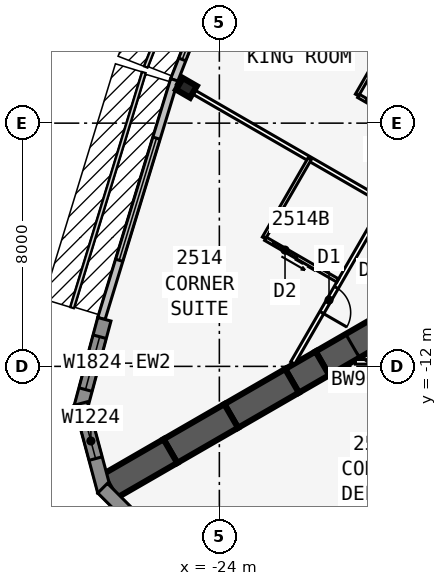
"""IFC4 building model, lengths in metres.
Left out: names, types, materials, properties, quantities, classifications, styles, units other than length and angle.
Written with IfcOpenShell. Run it as: python <this file> out.ifc"""

import sys

from ifc_helpers import new_model, si_unit, direction, frame, frame_2d, origin, origin_2d, place, context, subcontext, project, spatial, polyline, rectangle, i_section, outline, extrude, element, fill, save


model = new_model("IFC4")
c1 = context("Model", 3, precision=1e-05, world=origin(), true_north=direction((0.0, 1.0)))
c2 = subcontext(c1, "Body", "Model", "MODEL_VIEW")
j1 = project(units=[si_unit("LENGTHUNIT", "METRE"), si_unit("PLANEANGLEUNIT", "RADIAN")], contexts=[c1])
p1 = place(None, origin())
s1 = spatial("IfcSite", under=j1, at=p1, CompositionType="ELEMENT")
p2 = place(p1, origin())
s2 = spatial("IfcBuilding", under=s1, at=p2, CompositionType="ELEMENT")
p3 = place(p2, frame((0.0, 0.0, 96.5)))
s3 = spatial("IfcBuildingStorey", under=s2, at=p3, CompositionType="ELEMENT", Elevation=96.5)
p4 = place(p3, frame((-16.5, -9.526, 0.0), z_axis=(0.0, 0.0, 1.0), x_axis=(-0.866031398331, -0.499989616998, 0.0)))
e1 = element("IfcWall", 1, at=p4, inside=s3, PredefinedType="SHEAR", context=c2, shape_type="SweptSolid", body=[
    extrude(rectangle(XDim=4.746, YDim=0.9, at=frame_2d((2.373, 0.0))), origin(), (0.0, 0.0, 1.0), 3.4),
])
p5 = place(p4, frame((1.8, 0.0, 0.0)))
e2 = element("IfcOpeningElement", 2, at=p5, cuts=e1, PredefinedType="OPENING", context=c2, shape_type="SweptSolid", body=[
    extrude(rectangle(XDim=1.8, YDim=2.13, at=frame_2d((0.9, 1.065))), frame((0.0, 0.46, 0.0), z_axis=(0.0, -1.0, 0.0), x_axis=(1.0, 0.0, 0.0)), (0.0, 0.0, 1.0), 0.92),
])
p6 = place(p3, frame((-20.61, -11.899, 0.0), z_axis=(0.0, 0.0, 1.0), x_axis=(-0.866009537788, -0.500027479704, 0.0)))
e3 = element("IfcWall", 3, at=p6, inside=s3, PredefinedType="SHEAR", context=c2, shape_type="SweptSolid", body=[
    extrude(rectangle(XDim=1.155, YDim=0.9, at=frame_2d((0.577, 0.0))), origin(), (0.0, 0.0, 1.0), 3.4),
])
for number, where, z_axis, x_axis in (
    (4, (-21.61, -12.477, 0.0), (0.0, 0.0, 1.0), (-0.866, -0.5, 0.0)),
    (5, (-23.61, -13.631, 0.0), (0.0, 0.0, 1.0), (-0.866, -0.5, 0.0)),
    (6, (-25.61, -14.786, 0.0), (0.0, 0.0, 1.0), (-0.866, -0.5, 0.0)),
):
    element("IfcWall", number, at=place(p3, frame(where, z_axis=z_axis, x_axis=x_axis)), inside=s3, PredefinedType="SHEAR", context=c2, shape_type="SweptSolid", body=[
        extrude(rectangle(XDim=2.309, YDim=0.9, at=frame_2d((1.155, 0.0))), origin(), (0.0, 0.0, 1.0), 3.4),
    ])
p7 = place(p3, frame((-25.083, -2.839, 0.0), z_axis=(0.0, 0.0, 1.0), x_axis=(-0.5, -0.866025403784, 0.0)))
e7 = element("IfcColumn", 7, at=p7, inside=s3, PredefinedType="COLUMN", context=c2, shape_type="SweptSolid", body=[
    extrude(i_section(OverallWidth=0.442, OverallDepth=0.531, WebThickness=0.066, FlangeThickness=0.106, at=origin_2d()), origin(), (0.0, 0.0, 1.0), 3.4),
])
p8 = place(p3, frame((-23.645, 2.126, 0.0), z_axis=(0.0, 0.0, 1.0), x_axis=(-0.364013463868, -0.931393685894, 0.0)))
e8 = element("IfcWall", 8, at=p8, inside=s3, PredefinedType="STANDARD", context=c2, shape_type="SweptSolid", body=[
    extrude(rectangle(XDim=5.058, YDim=0.25, at=frame_2d((2.529, 0.0))), origin(), (0.0, 0.0, 1.0), 3.235),
])
p9 = place(p8, frame((0.729, 0.0, 0.45)))
e9 = element("IfcOpeningElement", 9, at=p9, cuts=e8, PredefinedType="OPENING", context=c2, shape_type="SweptSolid", body=[
    extrude(rectangle(XDim=3.6, YDim=2.4, at=frame_2d((1.8, 1.2))), frame((0.0, 0.135, 0.0), z_axis=(0.0, -1.0, 0.0), x_axis=(1.0, 0.0, 0.0)), (0.0, 0.0, 1.0), 0.27),
])
p10 = place(p3, frame((-25.483, -2.575, 0.0), z_axis=(0.0, 0.0, 1.0), x_axis=(-0.2919790669, -0.956424709265, 0.0)))
e10 = element("IfcWall", 10, at=p10, inside=s3, PredefinedType="STANDARD", context=c2, shape_type="SweptSolid", body=[
    extrude(rectangle(XDim=8.211, YDim=0.25, at=frame_2d((4.105, 0.0))), origin(), (0.0, 0.0, 1.0), 3.235),
])
p11 = place(p10, frame((2.006, 0.0, 0.45)))
e11 = element("IfcOpeningElement", 11, at=p11, cuts=e10, PredefinedType="OPENING", context=c2, shape_type="SweptSolid", body=[
    extrude(rectangle(XDim=4.2, YDim=2.4, at=frame_2d((2.1, 1.2))), frame((0.0, 0.135, 0.0), z_axis=(0.0, -1.0, 0.0), x_axis=(1.0, 0.0, 0.0)), (0.0, 0.0, 1.0), 0.27),
])
p12 = place(p3, frame((-27.783, -10.45, 0.0), z_axis=(0.0, 0.0, 1.0), x_axis=(-0.258780998834, -0.965936019953, 0.0)))
e12 = element("IfcWall", 12, at=p12, inside=s3, PredefinedType="SOLIDWALL", context=c2, shape_type="SweptSolid", body=[
    extrude(rectangle(XDim=2.989, YDim=0.45, at=frame_2d((1.494, 0.0))), origin(), (0.0, 0.0, 1.0), 3.235),
])
p13 = place(p12, frame((0.594, 0.0, 0.45)))
e13 = element("IfcOpeningElement", 13, at=p13, cuts=e12, PredefinedType="OPENING", context=c2, shape_type="SweptSolid", body=[
    extrude(rectangle(XDim=1.8, YDim=2.4, at=frame_2d((0.9, 1.2))), frame((0.0, 0.235, 0.0), z_axis=(0.0, -1.0, 0.0), x_axis=(1.0, 0.0, 0.0)), (0.0, 0.0, 1.0), 0.47),
])
p14 = place(p3, frame((-28.556, -13.221, 0.0), z_axis=(0.0, 0.0, 1.0), x_axis=(0.258801419081, -0.965930548995, 0.0)))
e14 = element("IfcWall", 14, at=p14, inside=s3, PredefinedType="SOLIDWALL", context=c2, shape_type="SweptSolid", body=[
    extrude(outline(polyline([(2.989, 0.225), (2.929, 0.225), (2.437, 0.093), (2.402, 0.225), (0.0, 0.225), (0.0, -0.225), (2.989, -0.225), (2.989, 0.225)])), origin(), (0.0, 0.0, 1.0), 3.235),
])
p15 = place(p14, frame((0.676, 0.0, 0.45)))
e15 = element("IfcOpeningElement", 15, at=p15, cuts=e14, PredefinedType="OPENING", context=c2, shape_type="SweptSolid", body=[
    extrude(rectangle(XDim=1.2, YDim=2.4, at=frame_2d((0.6, 1.2))), frame((0.0, 0.235, 0.0), z_axis=(0.0, -1.0, 0.0), x_axis=(1.0, 0.0, 0.0)), (0.0, 0.0, 1.0), 0.47),
])
p16 = place(p3, frame((-27.841, -16.007, 0.0), z_axis=(0.0, 0.0, 1.0), x_axis=(0.707025086683, -0.707188466253, 0.0)))
e16 = element("IfcWall", 16, at=p16, inside=s3, PredefinedType="SOLIDWALL", context=c2, shape_type="SweptSolid", body=[
    extrude(outline(polyline([(2.989, 0.225), (0.586, 0.225), (0.551, 0.093), (0.059, 0.225), (0.0, 0.225), (0.0, -0.225), (2.989, -0.225), (2.989, 0.225)])), origin(), (0.0, 0.0, 1.0), 3.235),
])
p17 = place(p16, frame((1.113, 0.0, 0.45)))
e17 = element("IfcOpeningElement", 17, at=p17, cuts=e16, PredefinedType="OPENING", context=c2, shape_type="SweptSolid", body=[
    extrude(rectangle(XDim=1.2, YDim=2.4, at=frame_2d((0.6, 1.2))), frame((0.0, 0.235, 0.0), z_axis=(0.0, -1.0, 0.0), x_axis=(1.0, 0.0, 0.0)), (0.0, 0.0, 1.0), 0.47),
])
p18 = place(p3, frame((-19.527, -11.851, 0.0), z_axis=(0.0, 0.0, 1.0), x_axis=(1.0, 0.0, 0.0)))
e18 = element("IfcWall", 18, at=p18, inside=s3, PredefinedType="PARTITIONING", context=c2, shape_type="SweptSolid", body=[
    extrude(rectangle(XDim=39.054, YDim=0.15, at=frame_2d((19.527, 0.0))), origin(), (0.0, 0.0, 1.0), 3.235),
])
p19 = place(p18, frame((1.558, 0.0, 0.0)))
e19 = element("IfcOpeningElement", 19, at=p19, cuts=e18, PredefinedType="OPENING", context=c2, shape_type="SweptSolid", body=[
    extrude(rectangle(XDim=0.95, YDim=2.13, at=frame_2d((0.475, 1.065))), frame((0.0, 0.085, 0.0), z_axis=(0.0, -1.0, 0.0), x_axis=(1.0, 0.0, 0.0)), (0.0, 0.0, 1.0), 0.17),
])
p20 = place(p18, frame((11.552, 0.0, 0.0)))
e20 = element("IfcOpeningElement", 20, at=p20, cuts=e18, PredefinedType="OPENING", context=c2, shape_type="SweptSolid", body=[
    extrude(rectangle(XDim=0.95, YDim=2.13, at=frame_2d((0.475, 1.065))), frame((0.0, 0.085, 0.0), z_axis=(0.0, -1.0, 0.0), x_axis=(1.0, 0.0, 0.0)), (0.0, 0.0, 1.0), 0.17),
])
p21 = place(p18, frame((21.527, 0.0, 0.0)))
e21 = element("IfcOpeningElement", 21, at=p21, cuts=e18, PredefinedType="OPENING", context=c2, shape_type="SweptSolid", body=[
    extrude(rectangle(XDim=1.0, YDim=2.13, at=frame_2d((0.5, 1.065))), frame((0.0, 0.085, 0.0), z_axis=(0.0, -1.0, 0.0), x_axis=(1.0, 0.0, 0.0)), (0.0, 0.0, 1.0), 0.17),
])
p22 = place(p18, frame((26.552, 0.0, 0.0)))
e22 = element("IfcOpeningElement", 22, at=p22, cuts=e18, PredefinedType="OPENING", context=c2, shape_type="SweptSolid", body=[
    extrude(rectangle(XDim=0.95, YDim=2.13, at=frame_2d((0.475, 1.065))), frame((0.0, 0.085, 0.0), z_axis=(0.0, -1.0, 0.0), x_axis=(1.0, 0.0, 0.0)), (0.0, 0.0, 1.0), 0.17),
])
p23 = place(p18, frame((37.752, 0.0, 0.0)))
e23 = element("IfcOpeningElement", 23, at=p23, cuts=e18, PredefinedType="OPENING", context=c2, shape_type="SweptSolid", body=[
    extrude(rectangle(XDim=0.95, YDim=2.13, at=frame_2d((0.475, 1.065))), frame((0.0, 0.085, 0.0), z_axis=(0.0, -1.0, 0.0), x_axis=(1.0, 0.0, 0.0)), (0.0, 0.0, 1.0), 0.17),
])
p24 = place(p3, frame((-0.5, 24.636, 0.0), z_axis=(0.0, 0.0, 1.0), x_axis=(-0.500001915564, -0.86602429783, 0.0)))
e24 = element("IfcWall", 24, at=p24, inside=s3, PredefinedType="PARTITIONING", context=c2, shape_type="SweptSolid", body=[
    extrude(rectangle(XDim=42.172, YDim=0.15, at=frame_2d((21.086, 0.0))), origin(), (0.0, 0.0, 1.0), 3.235),
])
p25 = place(p24, frame((1.911, 0.0, 0.0)))
e25 = element("IfcOpeningElement", 25, at=p25, cuts=e24, PredefinedType="OPENING", context=c2, shape_type="SweptSolid", body=[
    extrude(rectangle(XDim=0.95, YDim=2.13, at=frame_2d((0.475, 1.065))), frame((0.0, 0.085, 0.0), z_axis=(0.0, -1.0, 0.0), x_axis=(1.0, 0.0, 0.0)), (0.0, 0.0, 1.0), 0.17),
])
p26 = place(p24, frame((8.111, 0.0, 0.0)))
e26 = element("IfcOpeningElement", 26, at=p26, cuts=e24, PredefinedType="OPENING", context=c2, shape_type="SweptSolid", body=[
    extrude(rectangle(XDim=0.95, YDim=2.13, at=frame_2d((0.475, 1.065))), frame((0.0, 0.085, 0.0), z_axis=(0.0, -1.0, 0.0), x_axis=(1.0, 0.0, 0.0)), (0.0, 0.0, 1.0), 0.17),
])
p27 = place(p24, frame((18.111, 0.0, 0.0)))
e27 = element("IfcOpeningElement", 27, at=p27, cuts=e24, PredefinedType="OPENING", context=c2, shape_type="SweptSolid", body=[
    extrude(rectangle(XDim=0.95, YDim=2.13, at=frame_2d((0.475, 1.065))), frame((0.0, 0.085, 0.0), z_axis=(0.0, -1.0, 0.0), x_axis=(1.0, 0.0, 0.0)), (0.0, 0.0, 1.0), 0.17),
])
p28 = place(p24, frame((28.711, 0.0, 0.0)))
e28 = element("IfcOpeningElement", 28, at=p28, cuts=e24, PredefinedType="OPENING", context=c2, shape_type="SweptSolid", body=[
    extrude(rectangle(XDim=0.95, YDim=2.13, at=frame_2d((0.475, 1.065))), frame((0.0, 0.085, 0.0), z_axis=(0.0, -1.0, 0.0), x_axis=(1.0, 0.0, 0.0)), (0.0, 0.0, 1.0), 0.17),
])
p29 = place(p24, frame((33.711, 0.0, 0.0)))
e29 = element("IfcOpeningElement", 29, at=p29, cuts=e24, PredefinedType="OPENING", context=c2, shape_type="SweptSolid", body=[
    extrude(rectangle(XDim=0.95, YDim=2.13, at=frame_2d((0.475, 1.065))), frame((0.0, 0.085, 0.0), z_axis=(0.0, -1.0, 0.0), x_axis=(1.0, 0.0, 0.0)), (0.0, 0.0, 1.0), 0.17),
])
p30 = place(p24, frame((39.311, 0.0, 0.0)))
e30 = element("IfcOpeningElement", 30, at=p30, cuts=e24, PredefinedType="OPENING", context=c2, shape_type="SweptSolid", body=[
    extrude(rectangle(XDim=0.95, YDim=2.13, at=frame_2d((0.475, 1.065))), frame((0.0, 0.085, 0.0), z_axis=(0.0, -1.0, 0.0), x_axis=(1.0, 0.0, 0.0)), (0.0, 0.0, 1.0), 0.17),
])
p31 = place(p3, frame((-16.108, -2.247, 0.0), z_axis=(0.0, 0.0, 1.0), x_axis=(-0.866018881988, 0.500011295912, 0.0)))
e31 = element("IfcWall", 31, at=p31, inside=s3, PredefinedType="PARTITIONING", context=c2, shape_type="SweptSolid", body=[
    extrude(rectangle(XDim=8.585, YDim=0.15, at=frame_2d((4.292, 0.0))), origin(), (0.0, 0.0, 1.0), 2.389),
])
p32 = place(p3, frame((-18.608, -6.577, 0.0), z_axis=(0.0, 0.0, 1.0), x_axis=(-0.866034818847, 0.499983692279, 0.0)))
e32 = element("IfcWall", 32, at=p32, inside=s3, PredefinedType="PARTITIONING", context=c2, shape_type="SweptSolid", body=[
    extrude(rectangle(XDim=7.82, YDim=0.15, at=frame_2d((3.91, 0.0))), origin(), (0.0, 0.0, 1.0), 2.389),
])
p33 = place(p3, frame((-18.273, -0.997, 0.0), z_axis=(0.0, 0.0, 1.0), x_axis=(-0.499957262057, -0.866050077142, 0.0)))
e33 = element("IfcWall", 33, at=p33, inside=s3, PredefinedType="PLUMBINGWALL", context=c2, shape_type="SweptSolid", body=[
    extrude(rectangle(XDim=2.4, YDim=0.12, at=frame_2d((1.2, 0.0))), origin(), (0.0, 0.0, 1.0), 3.235),
])
p34 = place(p3, frame((-17.308, -4.326, 0.0), z_axis=(0.0, 0.0, 1.0), x_axis=(-0.866023955769, 0.500002508028, 0.0)))
e34 = element("IfcWall", 34, at=p34, inside=s3, PredefinedType="PLUMBINGWALL", context=c2, shape_type="SweptSolid", body=[
    extrude(rectangle(XDim=2.44, YDim=0.12, at=frame_2d((1.22, 0.0))), origin(), (0.0, 0.0, 1.0), 3.235),
])
p35 = place(p34, frame((1.25, 0.0, 0.0)))
e35 = element("IfcOpeningElement", 35, at=p35, cuts=e34, PredefinedType="OPENING", context=c2, shape_type="SweptSolid", body=[
    extrude(rectangle(XDim=0.9, YDim=2.13, at=frame_2d((0.45, 1.065))), frame((0.0, 0.07, 0.0), z_axis=(0.0, -1.0, 0.0), x_axis=(1.0, 0.0, 0.0)), (0.0, 0.0, 1.0), 0.14),
])
p36 = place(p3, frame((-21.033, -5.177, 0.0), z_axis=(0.0, 0.0, 1.0), x_axis=(-0.499990139034, -0.866031096941, 0.0)))
e36 = element("IfcWall", 36, at=p36, inside=s3, PredefinedType="PLUMBINGWALL", context=c2, shape_type="SweptSolid", body=[
    extrude(rectangle(XDim=3.0, YDim=0.12, at=frame_2d((1.5, 0.0))), origin(), (0.0, 0.0, 1.0), 3.235),
])
p37 = place(p3, frame((-20.108, -9.175, 0.0), z_axis=(0.0, 0.0, 1.0), x_axis=(-0.866035715982, 0.499982138324, 0.0)))
e37 = element("IfcWall", 37, at=p37, inside=s3, PredefinedType="PLUMBINGWALL", context=c2, shape_type="SweptSolid", body=[
    extrude(rectangle(XDim=2.74, YDim=0.12, at=frame_2d((1.37, 0.0))), origin(), (0.0, 0.0, 1.0), 3.235),
])
p38 = place(p37, frame((1.55, 0.0, 0.0)))
e38 = element("IfcOpeningElement", 38, at=p38, cuts=e37, PredefinedType="OPENING", context=c2, shape_type="SweptSolid", body=[
    extrude(rectangle(XDim=0.9, YDim=2.13, at=frame_2d((0.45, 1.065))), frame((0.0, 0.07, 0.0), z_axis=(0.0, -1.0, 0.0), x_axis=(1.0, 0.0, 0.0)), (0.0, 0.0, 1.0), 0.14),
])
p39 = place(p9, origin())
e39 = element("IfcWindow", 39, at=p39, inside=s3, PartitioningType="SINGLE_PANEL", PredefinedType="WINDOW", context=c2, shape_type="SweptSolid", body=[
    extrude(rectangle(XDim=3.6, YDim=2.4, at=frame_2d((1.8, 1.2))), frame((0.0, 0.03, 0.0), z_axis=(0.0, -1.0, 0.0), x_axis=(1.0, 0.0, 0.0)), (0.0, 0.0, 1.0), 0.06),
])
fill(e9, e39)
p40 = place(p11, origin())
e40 = element("IfcWindow", 40, at=p40, inside=s3, PartitioningType="SINGLE_PANEL", PredefinedType="WINDOW", context=c2, shape_type="SweptSolid", body=[
    extrude(rectangle(XDim=4.2, YDim=2.4, at=frame_2d((2.1, 1.2))), frame((0.0, 0.03, 0.0), z_axis=(0.0, -1.0, 0.0), x_axis=(1.0, 0.0, 0.0)), (0.0, 0.0, 1.0), 0.06),
])
fill(e11, e40)
p41 = place(p13, origin())
e41 = element("IfcWindow", 41, at=p41, inside=s3, PartitioningType="SINGLE_PANEL", PredefinedType="WINDOW", context=c2, shape_type="SweptSolid", body=[
    extrude(rectangle(XDim=1.8, YDim=2.4, at=frame_2d((0.9, 1.2))), frame((0.0, 0.03, 0.0), z_axis=(0.0, -1.0, 0.0), x_axis=(1.0, 0.0, 0.0)), (0.0, 0.0, 1.0), 0.06),
])
fill(e13, e41)
p42 = place(p15, origin())
e42 = element("IfcWindow", 42, at=p42, inside=s3, PartitioningType="SINGLE_PANEL", PredefinedType="WINDOW", context=c2, shape_type="SweptSolid", body=[
    extrude(rectangle(XDim=1.2, YDim=2.4, at=frame_2d((0.6, 1.2))), frame((0.0, 0.03, 0.0), z_axis=(0.0, -1.0, 0.0), x_axis=(1.0, 0.0, 0.0)), (0.0, 0.0, 1.0), 0.06),
])
fill(e15, e42)
p43 = place(p35, origin())
e43 = element("IfcDoor", 43, at=p43, inside=s3, OperationType="SLIDING_TO_LEFT", PredefinedType="DOOR", context=c2, shape_type="SweptSolid", body=[
    extrude(rectangle(XDim=0.9, YDim=2.13, at=frame_2d((0.45, 1.065))), frame((0.0, 0.025, 0.0), z_axis=(0.0, -1.0, 0.0), x_axis=(1.0, 0.0, 0.0)), (0.0, 0.0, 1.0), 0.05),
])
fill(e35, e43)
p44 = place(p38, origin())
e44 = element("IfcDoor", 44, at=p44, inside=s3, OperationType="SLIDING_TO_LEFT", PredefinedType="DOOR", context=c2, shape_type="SweptSolid", body=[
    extrude(rectangle(XDim=0.9, YDim=2.13, at=frame_2d((0.45, 1.065))), frame((0.0, 0.025, 0.0), z_axis=(0.0, -1.0, 0.0), x_axis=(1.0, 0.0, 0.0)), (0.0, 0.0, 1.0), 0.05),
])
fill(e38, e44)
p45 = place(p30, origin())
e45 = element("IfcDoor", 45, at=p45, inside=s3, OperationType="SINGLE_SWING_RIGHT", PredefinedType="DOOR", context=c2, shape_type="SweptSolid", body=[
    extrude(rectangle(XDim=0.95, YDim=2.13, at=frame_2d((0.475, 1.065))), frame((0.0, 0.025, 0.0), z_axis=(0.0, -1.0, 0.0), x_axis=(1.0, 0.0, 0.0)), (0.0, 0.0, 1.0), 0.05),
])
fill(e30, e45)
p46 = place(p5, origin())
e46 = element("IfcDoor", 46, at=p46, inside=s3, OperationType="DOUBLE_DOOR_DOUBLE_SWING", PredefinedType="DOOR", context=c2, shape_type="SweptSolid", body=[
    extrude(rectangle(XDim=1.8, YDim=2.13, at=frame_2d((0.9, 1.065))), frame((0.0, 0.025, 0.0), z_axis=(0.0, -1.0, 0.0), x_axis=(1.0, 0.0, 0.0)), (0.0, 0.0, 1.0), 0.05),
])
fill(e2, e46)
save(model, sys.argv[1])
